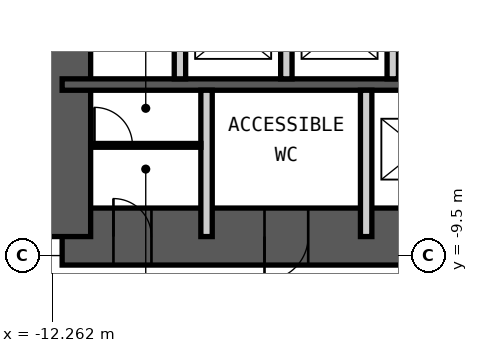
"""IFC4 building model, lengths in metres.
Left out: names, types, materials, properties, quantities, classifications, styles, units other than length and angle.
Written with IfcOpenShell. Run it as: python <this file> out.ifc"""

import sys

from ifc_helpers import new_model, si_unit, direction, frame, frame_2d, origin, place, context, subcontext, project, spatial, rectangle, extrude, element, fill, save


model = new_model("IFC4")
c1 = context("Model", 3, precision=1e-05, world=origin(), true_north=direction((0.0, 1.0)))
c2 = subcontext(c1, "Body", "Model", "MODEL_VIEW")
j1 = project(units=[si_unit("LENGTHUNIT", "METRE"), si_unit("PLANEANGLEUNIT", "RADIAN")], contexts=[c1])
p1 = place(None, origin())
s1 = spatial("IfcSite", under=j1, at=p1, CompositionType="ELEMENT")
p2 = place(p1, origin())
s2 = spatial("IfcBuilding", under=s1, at=p2, CompositionType="ELEMENT")
p3 = place(p2, frame((0.0, 0.0, 103.0)))
s3 = spatial("IfcBuildingStorey", under=s2, at=p3, CompositionType="ELEMENT", Elevation=103.0)
p4 = place(p3, frame((-12.0, -9.0, 0.0), z_axis=(0.0, 0.0, 1.0), x_axis=(1.0, 0.0, 0.0)))
e1 = element("IfcWall", 1, at=p4, inside=s3, PredefinedType="SHEAR", context=c2, shape_type="SweptSolid", body=[
    extrude(rectangle(XDim=24.0, YDim=1.5, at=frame_2d((12.0, 0.0))), origin(), (0.0, 0.0, 1.0), 4.2),
])
p5 = place(p4, frame((1.35, 0.0, 0.0)))
e2 = element("IfcOpeningElement", 2, at=p5, cuts=e1, PredefinedType="OPENING", context=c2, shape_type="SweptSolid", body=[
    extrude(rectangle(XDim=1.0, YDim=2.1, at=frame_2d((0.5, 1.05))), frame((0.0, 0.76, 0.0), z_axis=(0.0, -1.0, 0.0), x_axis=(1.0, 0.0, 0.0)), (0.0, 0.0, 1.0), 1.52),
])
p6 = place(p4, frame((5.325, 0.0, 0.0)))
e3 = element("IfcOpeningElement", 3, at=p6, cuts=e1, PredefinedType="OPENING", context=c2, shape_type="SweptSolid", body=[
    extrude(rectangle(XDim=1.15, YDim=2.1, at=frame_2d((0.575, 1.05))), frame((0.0, 0.76, 0.0), z_axis=(0.0, -1.0, 0.0), x_axis=(1.0, 0.0, 0.0)), (0.0, 0.0, 1.0), 1.52),
])
p7 = place(p4, frame((12.6, 0.0, 0.0)))
e4 = element("IfcOpeningElement", 4, at=p7, cuts=e1, PredefinedType="OPENING", context=c2, shape_type="SweptSolid", body=[
    extrude(rectangle(XDim=1.0, YDim=2.1, at=frame_2d((0.5, 1.05))), frame((0.0, 0.76, 0.0), z_axis=(0.0, -1.0, 0.0), x_axis=(1.0, 0.0, 0.0)), (0.0, 0.0, 1.0), 1.52),
])
p8 = place(p3, frame((-12.0, -9.0, 0.0), z_axis=(0.0, 0.0, 1.0), x_axis=(0.0, 1.0, 0.0)))
e5 = element("IfcWall", 5, at=p8, inside=s3, PredefinedType="SHEAR", context=c2, shape_type="SweptSolid", body=[
    extrude(rectangle(XDim=18.0, YDim=1.5, at=frame_2d((9.0, 0.0))), origin(), (0.0, 0.0, 1.0), 4.2),
])
p9 = place(p8, frame((8.1, 0.0, 0.0)))
e6 = element("IfcOpeningElement", 6, at=p9, cuts=e5, PredefinedType="OPENING", context=c2, shape_type="SweptSolid", body=[
    extrude(rectangle(XDim=1.8, YDim=2.1, at=frame_2d((0.9, 1.05))), frame((0.0, 0.76, 0.0), z_axis=(0.0, -1.0, 0.0), x_axis=(1.0, 0.0, 0.0)), (0.0, 0.0, 1.0), 1.52),
])
p10 = place(p3, frame((-12.0, -5.0, 0.0), z_axis=(0.0, 0.0, 1.0), x_axis=(1.0, 0.0, 0.0)))
e7 = element("IfcWall", 7, at=p10, inside=s3, PredefinedType="SHEAR", context=c2, shape_type="SweptSolid", body=[
    extrude(rectangle(XDim=24.0, YDim=0.3, at=frame_2d((12.0, 0.0))), origin(), (0.0, 0.0, 1.0), 4.2),
])
for number, where, z_axis, x_axis in (
    (8, (-8.9, -4.85, 0.0), (0.0, 0.0, 1.0), (0.0, 1.0, 0.0)),
    (9, (-6.1, -4.85, 0.0), (0.0, 0.0, 1.0), (0.0, 1.0, 0.0)),
    (10, (-3.3, -4.85, 0.0), (0.0, 0.0, 1.0), (0.0, 1.0, 0.0)),
):
    element("IfcWall", number, at=place(p3, frame(where, z_axis=z_axis, x_axis=x_axis)), inside=s3, PredefinedType="PARTITIONING", context=c2, shape_type="SweptSolid", body=[
        extrude(rectangle(XDim=2.65, YDim=0.3, at=frame_2d((1.325, 0.0))), origin(), (0.0, 0.0, 1.0), 3.98),
    ])
for number, where, z_axis, x_axis in (
    (11, (-8.2, -9.0, 0.0), (0.0, 0.0, 1.0), (0.0, 1.0, 0.0)),
    (12, (-4.0, -9.0, 0.0), (0.0, 0.0, 1.0), (0.0, 1.0, 0.0)),
):
    element("IfcWall", number, at=place(p3, frame(where, z_axis=z_axis, x_axis=x_axis)), inside=s3, PredefinedType="PARTITIONING", context=c2, shape_type="SweptSolid", body=[
        extrude(rectangle(XDim=3.85, YDim=0.3, at=frame_2d((1.925, 0.0))), origin(), (0.0, 0.0, 1.0), 3.98),
    ])
p11 = place(p3, frame((-11.25, -6.6, 0.0), z_axis=(0.0, 0.0, 1.0), x_axis=(1.0, 0.0, 0.0)))
e13 = element("IfcWall", 13, at=p11, inside=s3, PredefinedType="PARTITIONING", context=c2, shape_type="SweptSolid", body=[
    extrude(rectangle(XDim=2.9, YDim=0.1, at=frame_2d((1.45, 0.0))), origin(), (0.0, 0.0, 1.0), 3.98),
])
p12 = place(p11, frame((0.1, 0.0, 0.0)))
e14 = element("IfcOpeningElement", 14, at=p12, cuts=e13, PredefinedType="OPENING", context=c2, shape_type="SweptSolid", body=[
    extrude(rectangle(XDim=1.0, YDim=2.4, at=frame_2d((0.5, 1.2))), frame((0.0, 0.06, 0.0), z_axis=(0.0, -1.0, 0.0), x_axis=(1.0, 0.0, 0.0)), (0.0, 0.0, 1.0), 0.12),
])
p13 = place(p5, origin())
e15 = element("IfcDoor", 15, at=p13, inside=s3, OperationType="SINGLE_SWING_RIGHT", PredefinedType="DOOR", context=c2, shape_type="SweptSolid", body=[
    extrude(rectangle(XDim=1.0, YDim=2.1, at=frame_2d((0.5, 1.05))), frame((0.0, 0.025, 0.0), z_axis=(0.0, -1.0, 0.0), x_axis=(1.0, 0.0, 0.0)), (0.0, 0.0, 1.0), 0.05),
])
fill(e2, e15)
p14 = place(p6, origin())
e16 = element("IfcDoor", 16, at=p14, inside=s3, OperationType="SINGLE_SWING_LEFT", PredefinedType="DOOR", context=c2, shape_type="SweptSolid", body=[
    extrude(rectangle(XDim=1.15, YDim=2.1, at=frame_2d((0.575, 1.05))), frame((0.0, 0.025, 0.0), z_axis=(0.0, -1.0, 0.0), x_axis=(1.0, 0.0, 0.0)), (0.0, 0.0, 1.0), 0.05),
])
fill(e3, e16)
p15 = place(p12, origin())
e17 = element("IfcDoor", 17, at=p15, inside=s3, OperationType="SINGLE_SWING_RIGHT", PredefinedType="DOOR", context=c2, shape_type="SweptSolid", body=[
    extrude(rectangle(XDim=1.0, YDim=2.4, at=frame_2d((0.5, 1.2))), frame((0.0, 0.025, 0.0), z_axis=(0.0, -1.0, 0.0), x_axis=(1.0, 0.0, 0.0)), (0.0, 0.0, 1.0), 0.05),
])
fill(e14, e17)
save(model, sys.argv[1])
